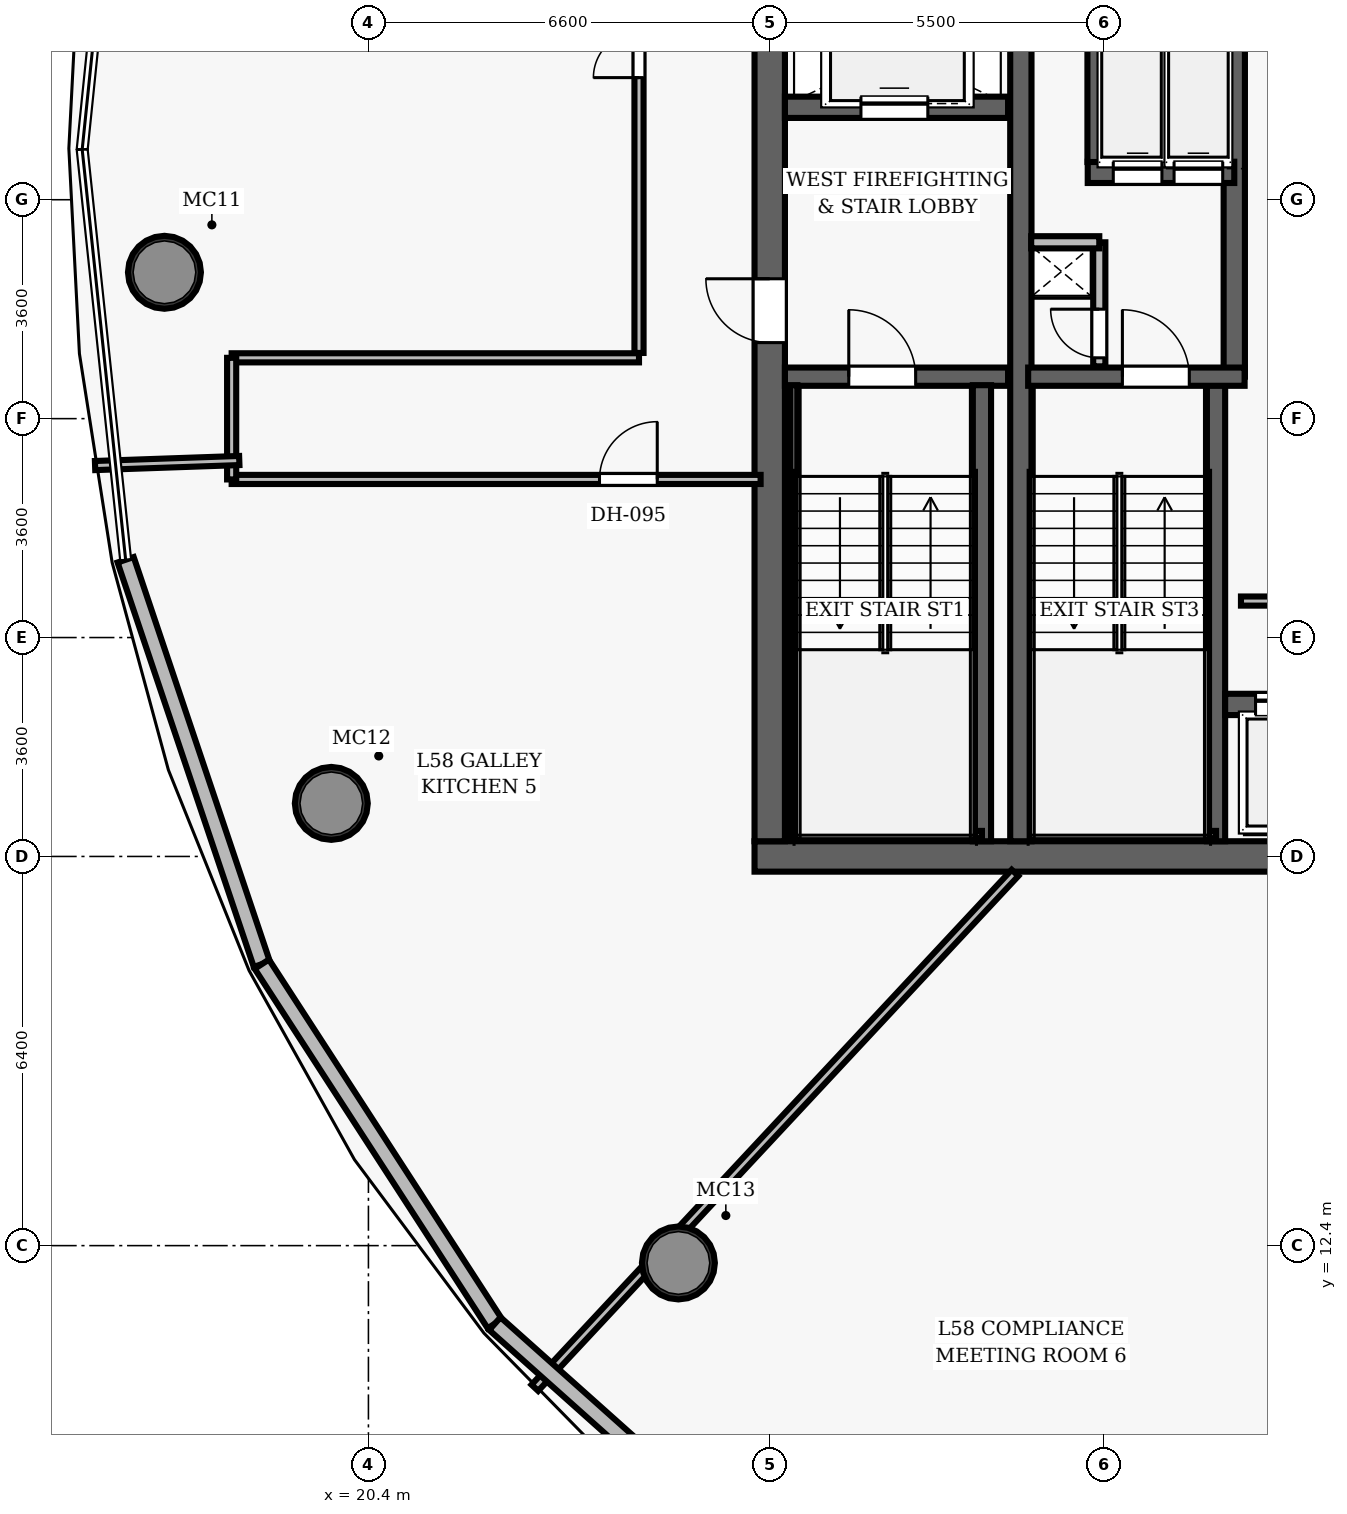
"""IFC4 building model, lengths in metres.
Left out: names, types, materials, properties, quantities, classifications, styles, units other than length and angle.
Written with IfcOpenShell. Run it as: python <this file> out.ifc"""

import sys

from ifc_helpers import new_model, si_unit, direction, frame, frame_2d, origin, origin_2d, place, context, subcontext, project, spatial, rectangle, hollow_circle, extrude, element, fill, save


model = new_model("IFC4")
c1 = context("Model", 3, precision=1e-05, world=origin(), true_north=direction((0.0, 1.0)))
c2 = subcontext(c1, "Body", "Model", "MODEL_VIEW")
j1 = project(units=[si_unit("LENGTHUNIT", "METRE"), si_unit("PLANEANGLEUNIT", "RADIAN")], contexts=[c1])
p1 = place(None, origin())
s1 = spatial("IfcSite", under=j1, at=p1, CompositionType="ELEMENT")
p2 = place(p1, origin())
s2 = spatial("IfcBuilding", under=s1, at=p2, CompositionType="ELEMENT")
p3 = place(p2, frame((0.0, 0.0, 228.95)))
s3 = spatial("IfcBuildingStorey", under=s2, at=p3, CompositionType="ELEMENT", Elevation=228.95)
p4 = place(p3, frame((26.75, 18.8, 0.0), z_axis=(0.0, 0.0, 1.0), x_axis=(1.0, 0.0, 0.0)))
e1 = element("IfcWall", 1, at=p4, inside=s3, PredefinedType="SHEAR", context=c2, shape_type="SweptSolid", body=[
    extrude(rectangle(XDim=22.5, YDim=0.5, at=frame_2d((11.25, 0.0))), origin(), (0.0, 0.0, 1.0), 3.85),
])
p5 = place(p4, frame((14.47, 0.0, 0.0)))
e2 = element("IfcOpeningElement", 2, at=p5, cuts=e1, PredefinedType="OPENING", context=c2, shape_type="SweptSolid", body=[
    extrude(rectangle(XDim=1.05, YDim=2.15, at=frame_2d((0.525, 1.075))), frame((0.0, 0.26, 0.0), z_axis=(0.0, -1.0, 0.0), x_axis=(1.0, 0.0, 0.0)), (0.0, 0.0, 1.0), 0.52),
])
p6 = place(p3, frame((27.0, 19.05, 0.0), z_axis=(0.0, 0.0, 1.0), x_axis=(0.0, 1.0, 0.0)))
e3 = element("IfcWall", 3, at=p6, inside=s3, PredefinedType="SHEAR", context=c2, shape_type="SweptSolid", body=[
    extrude(rectangle(XDim=13.9, YDim=0.5, at=frame_2d((6.95, 0.0))), origin(), (0.0, 0.0, 1.0), 3.85),
])
p7 = place(p6, frame((8.2, 0.0, 0.0)))
e4 = element("IfcOpeningElement", 4, at=p7, cuts=e3, PredefinedType="OPENING", context=c2, shape_type="SweptSolid", body=[
    extrude(rectangle(XDim=1.05, YDim=2.15, at=frame_2d((0.525, 1.075))), frame((0.0, 0.26, 0.0), z_axis=(0.0, -1.0, 0.0), x_axis=(1.0, 0.0, 0.0)), (0.0, 0.0, 1.0), 0.52),
])
p8 = place(p3, frame((31.13, 19.05, 0.0), z_axis=(0.0, 0.0, 1.0), x_axis=(0.0, 1.0, 0.0)))
e5 = element("IfcWall", 5, at=p8, inside=s3, PredefinedType="SHEAR", context=c2, shape_type="SweptSolid", body=[
    extrude(rectangle(XDim=13.9, YDim=0.35, at=frame_2d((6.95, 0.0))), origin(), (0.0, 0.0, 1.0), 3.85),
])
for number, where, z_axis, x_axis in (
    (6, (17.045, 28.406, 0.0), (0.0, 0.0, 1.0), (1.0, 0.0, 0.0)),
    (7, (19.79, 19.673, 0.0), (0.0, 0.0, 1.0), (1.0, 0.0, 0.0)),
    (8, (25.498, 12.115, 0.0), (0.0, 0.0, 1.0), (1.0, 0.0, 0.0)),
):
    element("IfcColumn", number, at=place(p3, frame(where, z_axis=z_axis, x_axis=x_axis)), inside=s3, PredefinedType="COLUMN", context=c2, shape_type="SweptSolid", body=[
        extrude(hollow_circle(Radius=0.6, WallThickness=0.05, at=origin_2d()), origin(), (0.0, 0.0, 1.0), 3.85),
    ])
p9 = place(p3, frame((27.25, 26.69, 0.0), z_axis=(0.0, 0.0, 1.0), x_axis=(1.0, 0.0, 0.0)))
e9 = element("IfcWall", 9, at=p9, inside=s3, PredefinedType="SHEAR", context=c2, shape_type="SweptSolid", body=[
    extrude(rectangle(XDim=3.67, YDim=0.3, at=frame_2d((1.835, 0.0))), origin(), (0.0, 0.0, 1.0), 3.85),
])
p10 = place(p9, frame((1.05, 0.0, 0.0)))
e10 = element("IfcOpeningElement", 10, at=p10, cuts=e9, PredefinedType="OPENING", context=c2, shape_type="SweptSolid", body=[
    extrude(rectangle(XDim=1.1, YDim=2.15, at=frame_2d((0.55, 1.075))), frame((0.0, 0.16, 0.0), z_axis=(0.0, -1.0, 0.0), x_axis=(1.0, 0.0, 0.0)), (0.0, 0.0, 1.0), 0.32),
])
p11 = place(p3, frame((30.49, 19.05, 0.0), z_axis=(0.0, 0.0, 1.0), x_axis=(0.0, 1.0, 0.0)))
e11 = element("IfcWall", 11, at=p11, inside=s3, PredefinedType="SHEAR", context=c2, shape_type="SweptSolid", body=[
    extrude(rectangle(XDim=7.5, YDim=0.3, at=frame_2d((3.75, 0.0))), origin(), (0.0, 0.0, 1.0), 3.85),
])
p12 = place(p3, frame((27.395, 19.1, 0.0), z_axis=(0.0, 0.0, 1.0), x_axis=(0.0, 1.0, 0.0)))
e12 = element("IfcWall", 12, at=p12, inside=s3, PredefinedType="SHEAR", context=c2, shape_type="SweptSolid", body=[
    extrude(rectangle(XDim=7.45, YDim=0.12, at=frame_2d((3.725, 0.0))), origin(), (0.0, 0.0, 1.0), 3.85),
])
p13 = place(p3, frame((27.395, 19.16, 0.0), z_axis=(0.0, 0.0, 1.0), x_axis=(1.0, 0.0, 0.0)))
e13 = element("IfcWall", 13, at=p13, inside=s3, PredefinedType="SHEAR", context=c2, shape_type="SweptSolid", body=[
    extrude(rectangle(XDim=3.095, YDim=0.12, at=frame_2d((1.547, 0.0))), origin(), (0.0, 0.0, 1.0), 3.85),
])
p14 = place(p3, frame((27.25, 31.12, 0.0), z_axis=(0.0, 0.0, 1.0), x_axis=(1.0, 0.0, 0.0)))
e14 = element("IfcWall", 14, at=p14, inside=s3, PredefinedType="SHEAR", context=c2, shape_type="SweptSolid", body=[
    extrude(rectangle(XDim=3.67, YDim=0.35, at=frame_2d((1.835, 0.0))), origin(), (0.0, 0.0, 1.0), 3.035),
])
p15 = place(p14, frame((1.25, 0.0, 0.0)))
e15 = element("IfcOpeningElement", 15, at=p15, cuts=e14, PredefinedType="OPENING", context=c2, shape_type="SweptSolid", body=[
    extrude(rectangle(XDim=1.1, YDim=2.15, at=frame_2d((0.55, 1.075))), frame((0.0, 0.185, 0.0), z_axis=(0.0, -1.0, 0.0), x_axis=(1.0, 0.0, 0.0)), (0.0, 0.0, 1.0), 0.37),
])
p16 = place(p3, frame((34.34, 19.05, 0.0), z_axis=(0.0, 0.0, 1.0), x_axis=(0.0, 1.0, 0.0)))
e16 = element("IfcWall", 16, at=p16, inside=s3, PredefinedType="SHEAR", context=c2, shape_type="SweptSolid", body=[
    extrude(rectangle(XDim=7.5, YDim=0.3, at=frame_2d((3.75, 0.0))), origin(), (0.0, 0.0, 1.0), 3.85),
])
p17 = place(p3, frame((34.64, 26.69, 0.0), z_axis=(0.0, 0.0, 1.0), x_axis=(0.0, 1.0, 0.0)))
e17 = element("IfcWall", 17, at=p17, inside=s3, PredefinedType="SHEAR", context=c2, shape_type="SweptSolid", body=[
    extrude(rectangle(XDim=6.26, YDim=0.35, at=frame_2d((3.13, 0.0))), origin(), (0.0, 0.0, 1.0), 3.85),
])
p18 = place(p3, frame((31.25, 26.69, 0.0), z_axis=(0.0, 0.0, 1.0), x_axis=(1.0, 0.0, 0.0)))
e18 = element("IfcWall", 18, at=p18, inside=s3, PredefinedType="SHEAR", context=c2, shape_type="SweptSolid", body=[
    extrude(rectangle(XDim=3.56, YDim=0.3, at=frame_2d((1.78, 0.0))), origin(), (0.0, 0.0, 1.0), 3.85),
])
p19 = place(p18, frame((1.55, 0.0, 0.0)))
e19 = element("IfcOpeningElement", 19, at=p19, cuts=e18, PredefinedType="OPENING", context=c2, shape_type="SweptSolid", body=[
    extrude(rectangle(XDim=1.1, YDim=2.15, at=frame_2d((0.55, 1.075))), frame((0.0, 0.16, 0.0), z_axis=(0.0, -1.0, 0.0), x_axis=(1.0, 0.0, 0.0)), (0.0, 0.0, 1.0), 0.32),
])
p20 = place(p3, frame((31.3, 19.16, 0.0), z_axis=(0.0, 0.0, 1.0), x_axis=(1.0, 0.0, 0.0)))
e20 = element("IfcWall", 20, at=p20, inside=s3, PredefinedType="SHEAR", context=c2, shape_type="SweptSolid", body=[
    extrude(rectangle(XDim=3.04, YDim=0.12, at=frame_2d((1.52, 0.0))), origin(), (0.0, 0.0, 1.0), 3.85),
])
p21 = place(p3, frame((32.23, 30.05, 0.0), z_axis=(0.0, 0.0, 1.0), x_axis=(1.0, 0.0, 0.0)))
e21 = element("IfcWall", 21, at=p21, inside=s3, PredefinedType="SHEAR", context=c2, shape_type="SweptSolid", body=[
    extrude(rectangle(XDim=2.41, YDim=0.35, at=frame_2d((1.205, 0.0))), origin(), (0.0, 0.0, 1.0), 3.035),
])
p22 = place(p21, frame((0.42, 0.0, 0.0)))
e22 = element("IfcOpeningElement", 22, at=p22, cuts=e21, PredefinedType="OPENING", context=c2, shape_type="SweptSolid", body=[
    extrude(rectangle(XDim=0.8, YDim=2.15, at=frame_2d((0.4, 1.075))), frame((0.0, 0.185, 0.0), z_axis=(0.0, -1.0, 0.0), x_axis=(1.0, 0.0, 0.0)), (0.0, 0.0, 1.0), 0.37),
])
p23 = place(p21, frame((1.42, 0.0, 0.0)))
e23 = element("IfcOpeningElement", 23, at=p23, cuts=e21, PredefinedType="OPENING", context=c2, shape_type="SweptSolid", body=[
    extrude(rectangle(XDim=0.8, YDim=2.15, at=frame_2d((0.4, 1.075))), frame((0.0, 0.185, 0.0), z_axis=(0.0, -1.0, 0.0), x_axis=(1.0, 0.0, 0.0)), (0.0, 0.0, 1.0), 0.37),
])
p24 = place(p3, frame((32.4, 30.22, 0.0), z_axis=(0.0, 0.0, 1.0), x_axis=(0.0, 1.0, 0.0)))
e24 = element("IfcWall", 24, at=p24, inside=s3, PredefinedType="SHEAR", context=c2, shape_type="SweptSolid", body=[
    extrude(rectangle(XDim=2.73, YDim=0.35, at=frame_2d((1.365, 0.0))), origin(), (0.0, 0.0, 1.0), 3.035),
])
p25 = place(p3, frame((32.42, 26.86, 0.0), z_axis=(0.0, 0.0, 1.0), x_axis=(0.0, 1.0, 0.0)))
e25 = element("IfcWall", 25, at=p25, inside=s3, PredefinedType="PARTITIONING", context=c2, shape_type="SweptSolid", body=[
    extrude(rectangle(XDim=2.04, YDim=0.2, at=frame_2d((1.02, 0.0))), origin(), (0.0, 0.0, 1.0), 3.035),
])
p26 = place(p25, frame((0.14, 0.0, 0.0)))
e26 = element("IfcOpeningElement", 26, at=p26, cuts=e25, PredefinedType="OPENING", context=c2, shape_type="SweptSolid", body=[
    extrude(rectangle(XDim=0.8, YDim=2.05, at=frame_2d((0.4, 1.025))), frame((0.0, 0.11, 0.0), z_axis=(0.0, -1.0, 0.0), x_axis=(1.0, 0.0, 0.0)), (0.0, 0.0, 1.0), 0.22),
])
p27 = place(p3, frame((31.3, 28.9, 0.0), z_axis=(0.0, 0.0, 1.0), x_axis=(1.0, 0.0, 0.0)))
e27 = element("IfcWall", 27, at=p27, inside=s3, PredefinedType="PARTITIONING", context=c2, shape_type="SweptSolid", body=[
    extrude(rectangle(XDim=1.12, YDim=0.2, at=frame_2d((0.56, 0.0))), origin(), (0.0, 0.0, 1.0), 3.035),
])
p28 = place(p3, frame((34.49, 21.3, 0.0), z_axis=(0.0, 0.0, 1.0), x_axis=(1.0, 0.0, 0.0)))
e28 = element("IfcWall", 28, at=p28, inside=s3, PredefinedType="SHEAR", context=c2, shape_type="SweptSolid", body=[
    extrude(rectangle(XDim=6.68, YDim=0.35, at=frame_2d((3.34, 0.0))), origin(), (0.0, 0.0, 1.0), 3.035),
])
p29 = place(p28, frame((0.5, 0.0, 0.0)))
e29 = element("IfcOpeningElement", 29, at=p29, cuts=e28, PredefinedType="OPENING", context=c2, shape_type="SweptSolid", body=[
    extrude(rectangle(XDim=0.9, YDim=2.15, at=frame_2d((0.45, 1.075))), frame((0.0, 0.185, 0.0), z_axis=(0.0, -1.0, 0.0), x_axis=(1.0, 0.0, 0.0)), (0.0, 0.0, 1.0), 0.37),
])
p30 = place(p28, frame((2.58, 0.0, 0.0)))
e30 = element("IfcOpeningElement", 30, at=p30, cuts=e28, PredefinedType="OPENING", context=c2, shape_type="SweptSolid", body=[
    extrude(rectangle(XDim=0.9, YDim=2.15, at=frame_2d((0.45, 1.075))), frame((0.0, 0.185, 0.0), z_axis=(0.0, -1.0, 0.0), x_axis=(1.0, 0.0, 0.0)), (0.0, 0.0, 1.0), 0.37),
])
p31 = place(p28, frame((4.66, 0.0, 0.0)))
e31 = element("IfcOpeningElement", 31, at=p31, cuts=e28, PredefinedType="OPENING", context=c2, shape_type="SweptSolid", body=[
    extrude(rectangle(XDim=0.9, YDim=2.15, at=frame_2d((0.45, 1.075))), frame((0.0, 0.185, 0.0), z_axis=(0.0, -1.0, 0.0), x_axis=(1.0, 0.0, 0.0)), (0.0, 0.0, 1.0), 0.37),
])
p32 = place(p3, frame((34.75, 23.0, 0.0), z_axis=(0.0, 0.0, 1.0), x_axis=(1.0, 0.0, 0.0)))
e32 = element("IfcWall", 32, at=p32, inside=s3, PredefinedType="PARTITIONING", context=c2, shape_type="SweptSolid", body=[
    extrude(rectangle(XDim=6.25, YDim=0.15, at=frame_2d((3.125, 0.0))), origin(), (0.0, 0.0, 1.0), 3.035),
])
p33 = place(p3, frame((24.85, 27.08, 0.0), z_axis=(0.0, 0.0, 1.0), x_axis=(0.0, 1.0, 0.0)))
e33 = element("IfcWall", 33, at=p33, inside=s3, PredefinedType="PARTITIONING", context=c2, shape_type="SweptSolid", body=[
    extrude(rectangle(XDim=8.12, YDim=0.15, at=frame_2d((4.06, 0.0))), origin(), (0.0, 0.0, 1.0), 3.035),
])
p34 = place(p33, frame((4.528, 0.0, 0.0)))
e34 = element("IfcOpeningElement", 34, at=p34, cuts=e33, PredefinedType="OPENING", context=c2, shape_type="SweptSolid", body=[
    extrude(rectangle(XDim=1.5, YDim=2.2, at=frame_2d((0.75, 1.1))), frame((0.0, 0.085, 0.0), z_axis=(0.0, -1.0, 0.0), x_axis=(1.0, 0.0, 0.0)), (0.0, 0.0, 1.0), 0.17),
])
p35 = place(p3, frame((18.151, 27.0, 0.0), z_axis=(0.0, 0.0, 1.0), x_axis=(1.0, 0.0, 0.0)))
e35 = element("IfcWall", 35, at=p35, inside=s3, PredefinedType="PARTITIONING", context=c2, shape_type="SweptSolid", body=[
    extrude(rectangle(XDim=6.699, YDim=0.15, at=frame_2d((3.35, 0.0))), origin(), (0.0, 0.0, 1.0), 3.035),
])
p36 = place(p3, frame((18.151, 25.0, 0.0), z_axis=(0.0, 0.0, 1.0), x_axis=(1.0, 0.0, 0.0)))
e36 = element("IfcWall", 36, at=p36, inside=s3, PredefinedType="PARTITIONING", context=c2, shape_type="SweptSolid", body=[
    extrude(rectangle(XDim=8.699, YDim=0.15, at=frame_2d((4.35, 0.0))), origin(), (0.0, 0.0, 1.0), 3.035),
])
p37 = place(p36, frame((6.05, 0.0, 0.0)))
e37 = element("IfcOpeningElement", 37, at=p37, cuts=e36, PredefinedType="OPENING", context=c2, shape_type="SweptSolid", body=[
    extrude(rectangle(XDim=0.95, YDim=2.15, at=frame_2d((0.475, 1.075))), frame((0.0, 0.085, 0.0), z_axis=(0.0, -1.0, 0.0), x_axis=(1.0, 0.0, 0.0)), (0.0, 0.0, 1.0), 0.17),
])
p38 = place(p3, frame((18.151, 25.0, 0.0), z_axis=(0.0, 0.0, 1.0), x_axis=(0.0, 1.0, 0.0)))
e38 = element("IfcWall", 38, at=p38, inside=s3, PredefinedType="PARTITIONING", context=c2, shape_type="SweptSolid", body=[
    extrude(rectangle(XDim=2.0, YDim=0.15, at=frame_2d((1.0, 0.0))), origin(), (0.0, 0.0, 1.0), 3.035),
])
p39 = place(p3, frame((18.276, 25.311, 0.0), z_axis=(0.0, 0.0, 1.0), x_axis=(-0.999391742593, -0.034873268218, 0.0)))
e39 = element("IfcWall", 39, at=p39, inside=s3, PredefinedType="PARTITIONING", context=c2, shape_type="SweptSolid", body=[
    extrude(rectangle(XDim=2.373, YDim=0.15, at=frame_2d((1.187, 0.0))), origin(), (0.0, 0.0, 1.0), 3.035),
])
p40 = place(p3, frame((31.034, 18.53, 0.0), z_axis=(0.0, 0.0, 1.0), x_axis=(-0.681996659479, -0.731355287435, 0.0)))
e40 = element("IfcWall", 40, at=p40, inside=s3, PredefinedType="PARTITIONING", context=c2, shape_type="SweptSolid", body=[
    extrude(rectangle(XDim=11.579, YDim=0.15, at=frame_2d((5.79, 0.0))), origin(), (0.0, 0.0, 1.0), 3.035),
])
p41 = place(p3, frame((18.646, 17.029, 0.0), z_axis=(0.0, 0.0, 1.0), x_axis=(-0.319127764791, 0.947711701806, 0.0)))
e41 = element("IfcWall", 41, at=p41, inside=s3, PredefinedType="SOLIDWALL", context=c2, shape_type="SweptSolid", body=[
    extrude(rectangle(XDim=7.018, YDim=0.28, at=frame_2d((3.509, 0.0))), origin(), (0.0, 0.0, 1.0), 3.62),
])
for number, where, z_axis, x_axis in (
    (42, (22.479, 11.116, 0.0), (0.0, 0.0, 1.0), (-0.544, 0.839, 0.0)),
    (43, (27.735, 6.425, 0.0), (0.0, 0.0, 1.0), (-0.746, 0.666, 0.0)),
):
    element("IfcWall", number, at=place(p3, frame(where, z_axis=z_axis, x_axis=x_axis)), inside=s3, PredefinedType="SOLIDWALL", context=c2, shape_type="SweptSolid", body=[
        extrude(rectangle(XDim=7.046, YDim=0.28, at=frame_2d((3.523, 0.0))), origin(), (0.0, 0.0, 1.0), 3.62),
    ])
p42 = place(p10, origin())
e44 = element("IfcDoor", 44, at=p42, inside=s3, OperationType="SINGLE_SWING_LEFT", PredefinedType="DOOR", context=c2, shape_type="SweptSolid", body=[
    extrude(rectangle(XDim=1.1, YDim=2.15, at=frame_2d((0.55, 1.075))), frame((0.0, 0.025, 0.0), z_axis=(0.0, -1.0, 0.0), x_axis=(1.0, 0.0, 0.0)), (0.0, 0.0, 1.0), 0.05),
])
fill(e10, e44)
p43 = place(p7, origin())
e45 = element("IfcDoor", 45, at=p43, inside=s3, OperationType="SINGLE_SWING_RIGHT", PredefinedType="DOOR", context=c2, shape_type="SweptSolid", body=[
    extrude(rectangle(XDim=1.05, YDim=2.15, at=frame_2d((0.525, 1.075))), frame((0.0, 0.025, 0.0), z_axis=(0.0, -1.0, 0.0), x_axis=(1.0, 0.0, 0.0)), (0.0, 0.0, 1.0), 0.05),
])
fill(e4, e45)
p44 = place(p19, origin())
e46 = element("IfcDoor", 46, at=p44, inside=s3, OperationType="SINGLE_SWING_LEFT", PredefinedType="DOOR", context=c2, shape_type="SweptSolid", body=[
    extrude(rectangle(XDim=1.1, YDim=2.15, at=frame_2d((0.55, 1.075))), frame((0.0, 0.025, 0.0), z_axis=(0.0, -1.0, 0.0), x_axis=(1.0, 0.0, 0.0)), (0.0, 0.0, 1.0), 0.05),
])
fill(e19, e46)
p45 = place(p26, origin())
e47 = element("IfcDoor", 47, at=p45, inside=s3, OperationType="SINGLE_SWING_RIGHT", PredefinedType="DOOR", context=c2, shape_type="SweptSolid", body=[
    extrude(rectangle(XDim=0.8, YDim=2.05, at=frame_2d((0.4, 1.025))), frame((0.0, 0.025, 0.0), z_axis=(0.0, -1.0, 0.0), x_axis=(1.0, 0.0, 0.0)), (0.0, 0.0, 1.0), 0.05),
])
fill(e26, e47)
p46 = place(p34, origin())
e48 = element("IfcDoor", 48, at=p46, inside=s3, OperationType="DOUBLE_DOOR_SINGLE_SWING", PredefinedType="DOOR", context=c2, shape_type="SweptSolid", body=[
    extrude(rectangle(XDim=1.5, YDim=2.2, at=frame_2d((0.75, 1.1))), frame((0.0, 0.025, 0.0), z_axis=(0.0, -1.0, 0.0), x_axis=(1.0, 0.0, 0.0)), (0.0, 0.0, 1.0), 0.05),
])
fill(e34, e48)
p47 = place(p37, origin())
e49 = element("IfcDoor", 49, at=p47, inside=s3, OperationType="SINGLE_SWING_RIGHT", PredefinedType="DOOR", context=c2, shape_type="SweptSolid", body=[
    extrude(rectangle(XDim=0.95, YDim=2.15, at=frame_2d((0.475, 1.075))), frame((0.0, 0.025, 0.0), z_axis=(0.0, -1.0, 0.0), x_axis=(1.0, 0.0, 0.0)), (0.0, 0.0, 1.0), 0.05),
])
fill(e37, e49)
p48 = place(p29, origin())
e50 = element("IfcDoor", 50, at=p48, inside=s3, OperationType="SLIDING_TO_LEFT", PredefinedType="DOOR", context=c2, shape_type="SweptSolid", body=[
    extrude(rectangle(XDim=0.9, YDim=2.15, at=frame_2d((0.45, 1.075))), frame((0.0, 0.025, 0.0), z_axis=(0.0, -1.0, 0.0), x_axis=(1.0, 0.0, 0.0)), (0.0, 0.0, 1.0), 0.05),
])
fill(e29, e50)
p49 = place(p15, origin())
e51 = element("IfcDoor", 51, at=p49, inside=s3, OperationType="SLIDING_TO_LEFT", PredefinedType="DOOR", context=c2, shape_type="SweptSolid", body=[
    extrude(rectangle(XDim=1.1, YDim=2.15, at=frame_2d((0.55, 1.075))), frame((0.0, 0.025, 0.0), z_axis=(0.0, -1.0, 0.0), x_axis=(1.0, 0.0, 0.0)), (0.0, 0.0, 1.0), 0.05),
])
fill(e15, e51)
p50 = place(p22, origin())
e52 = element("IfcDoor", 52, at=p50, inside=s3, OperationType="SLIDING_TO_LEFT", PredefinedType="DOOR", context=c2, shape_type="SweptSolid", body=[
    extrude(rectangle(XDim=0.8, YDim=2.15, at=frame_2d((0.4, 1.075))), frame((0.0, 0.025, 0.0), z_axis=(0.0, -1.0, 0.0), x_axis=(1.0, 0.0, 0.0)), (0.0, 0.0, 1.0), 0.05),
])
fill(e22, e52)
p51 = place(p23, origin())
e53 = element("IfcDoor", 53, at=p51, inside=s3, OperationType="SLIDING_TO_LEFT", PredefinedType="DOOR", context=c2, shape_type="SweptSolid", body=[
    extrude(rectangle(XDim=0.8, YDim=2.15, at=frame_2d((0.4, 1.075))), frame((0.0, 0.025, 0.0), z_axis=(0.0, -1.0, 0.0), x_axis=(1.0, 0.0, 0.0)), (0.0, 0.0, 1.0), 0.05),
])
fill(e23, e53)
save(model, sys.argv[1])
